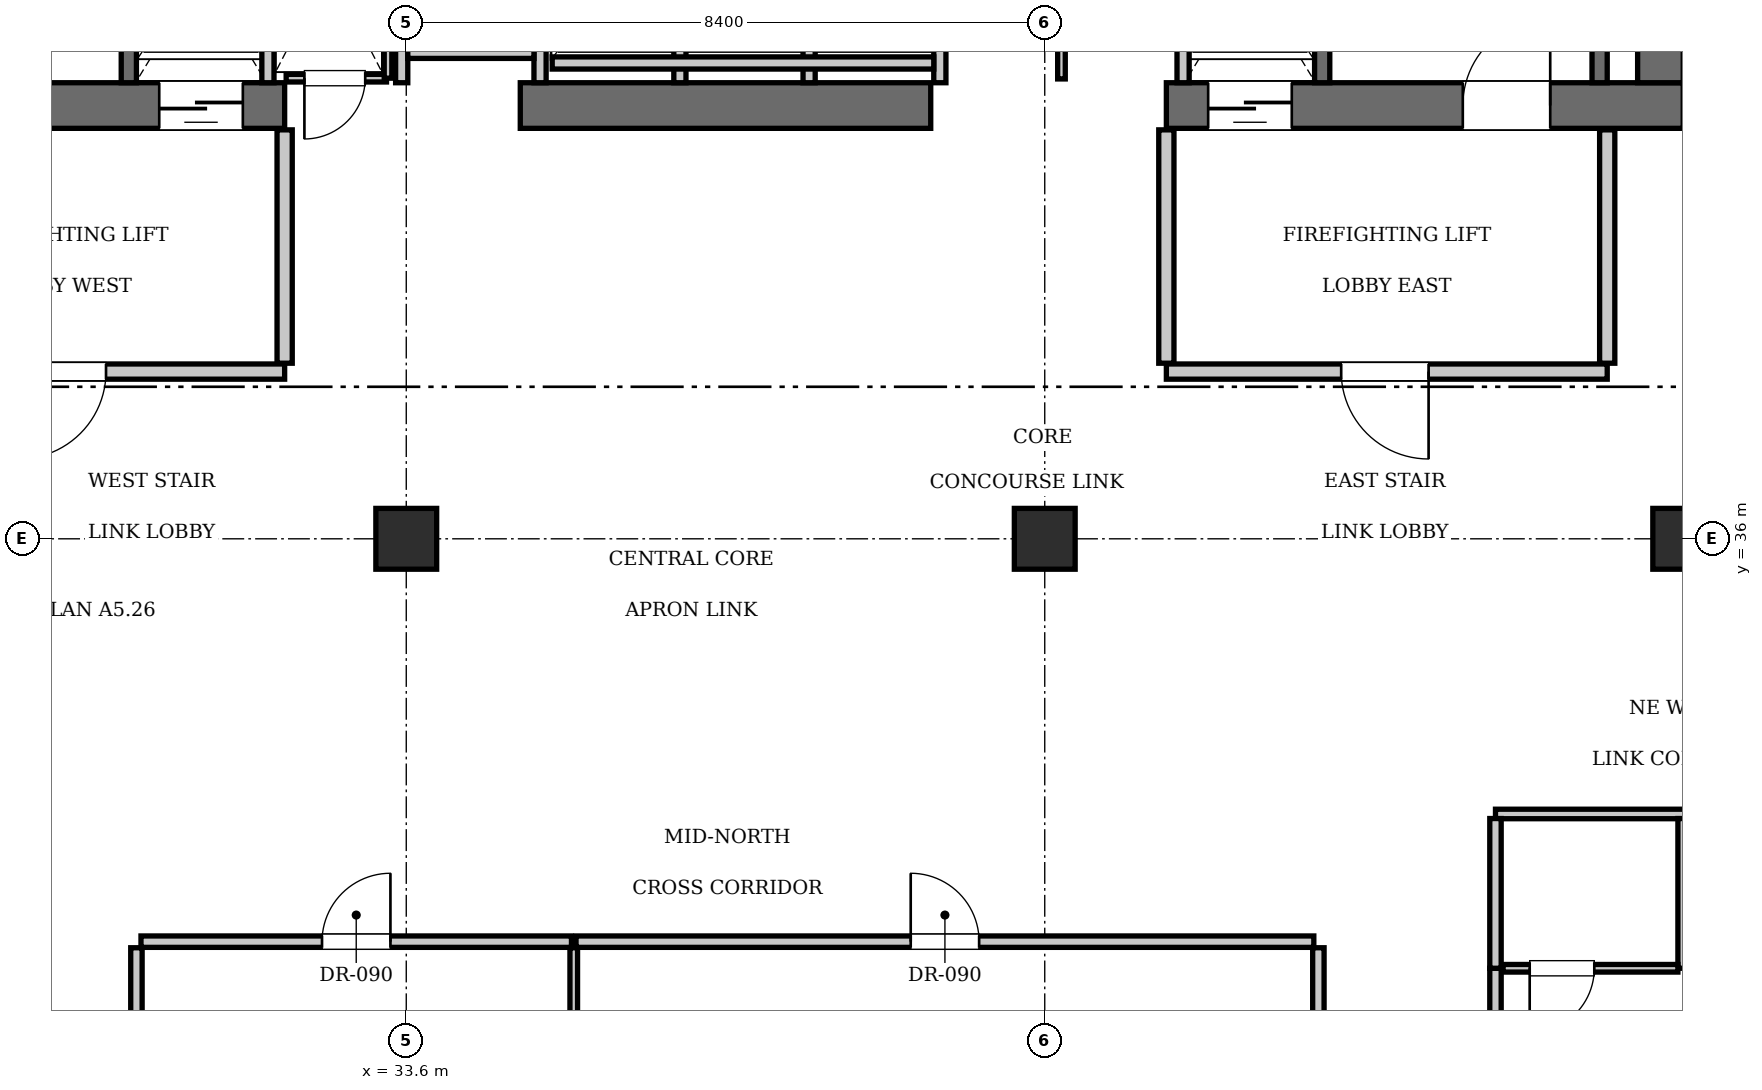
"""IFC4 building model, lengths in metres.
Left out: names, types, materials, properties, quantities, classifications, styles, units other than length and angle.
Written with IfcOpenShell. Run it as: python <this file> out.ifc"""

import sys

from ifc_helpers import new_model, si_unit, direction, frame, frame_2d, origin, origin_2d, place, context, subcontext, project, spatial, rectangle, extrude, element, fill, save


model = new_model("IFC4")
c1 = context("Model", 3, precision=1e-05, world=origin(), true_north=direction((0.0, 1.0)))
c2 = subcontext(c1, "Body", "Model", "MODEL_VIEW")
j1 = project(units=[si_unit("LENGTHUNIT", "METRE"), si_unit("PLANEANGLEUNIT", "RADIAN")], contexts=[c1])
p1 = place(None, origin())
s1 = spatial("IfcSite", under=j1, at=p1, CompositionType="ELEMENT")
p2 = place(p1, origin())
s2 = spatial("IfcBuilding", under=s1, at=p2, CompositionType="ELEMENT")
p3 = place(p2, frame((0.0, 0.0, 239.4)))
s3 = spatial("IfcBuildingStorey", under=s2, at=p3, CompositionType="ELEMENT", Elevation=239.4)
p4 = place(p3, frame((25.2, 41.7, 0.0), z_axis=(0.0, 0.0, 1.0), x_axis=(1.0, 0.0, 0.0)))
e1 = element("IfcWall", 1, at=p4, inside=s3, PredefinedType="SHEAR", context=c2, shape_type="SweptSolid", body=[
    extrude(rectangle(XDim=6.8, YDim=0.6, at=frame_2d((3.4, 0.0))), origin(), (0.0, 0.0, 1.0), 3.85),
])
p5 = place(p4, frame((1.65, 0.0, 0.0)))
e2 = element("IfcOpeningElement", 2, at=p5, cuts=e1, PredefinedType="OPENING", context=c2, shape_type="SweptSolid", body=[
    extrude(rectangle(XDim=1.15, YDim=2.15, at=frame_2d((0.575, 1.075))), frame((0.0, 0.31, 0.0), z_axis=(0.0, -1.0, 0.0), x_axis=(1.0, 0.0, 0.0)), (0.0, 0.0, 1.0), 0.62),
])
p6 = place(p4, frame((5.15, 0.0, 0.0)))
e3 = element("IfcOpeningElement", 3, at=p6, cuts=e1, PredefinedType="OPENING", context=c2, shape_type="SweptSolid", body=[
    extrude(rectangle(XDim=1.1, YDim=2.2, at=frame_2d((0.55, 1.1))), frame((0.0, 0.31, 0.0), z_axis=(0.0, -1.0, 0.0), x_axis=(1.0, 0.0, 0.0)), (0.0, 0.0, 1.0), 0.62),
])
p7 = place(p3, frame((35.1, 41.7, 0.0), z_axis=(0.0, 0.0, 1.0), x_axis=(1.0, 0.0, 0.0)))
e4 = element("IfcWall", 4, at=p7, inside=s3, PredefinedType="SHEAR", context=c2, shape_type="SweptSolid", body=[
    extrude(rectangle(XDim=5.4, YDim=0.6, at=frame_2d((2.7, 0.0))), origin(), (0.0, 0.0, 1.0), 3.85),
])
p8 = place(p3, frame((43.6, 41.7, 0.0), z_axis=(0.0, 0.0, 1.0), x_axis=(1.0, 0.0, 0.0)))
e5 = element("IfcWall", 5, at=p8, inside=s3, PredefinedType="SHEAR", context=c2, shape_type="SweptSolid", body=[
    extrude(rectangle(XDim=6.8, YDim=0.6, at=frame_2d((3.4, 0.0))), origin(), (0.0, 0.0, 1.0), 3.85),
])
p9 = place(p8, frame((3.9, 0.0, 0.0)))
e6 = element("IfcOpeningElement", 6, at=p9, cuts=e5, PredefinedType="OPENING", context=c2, shape_type="SweptSolid", body=[
    extrude(rectangle(XDim=1.15, YDim=2.15, at=frame_2d((0.575, 1.075))), frame((0.0, 0.31, 0.0), z_axis=(0.0, -1.0, 0.0), x_axis=(1.0, 0.0, 0.0)), (0.0, 0.0, 1.0), 0.62),
])
p10 = place(p8, frame((0.55, 0.0, 0.0)))
e7 = element("IfcOpeningElement", 7, at=p10, cuts=e5, PredefinedType="OPENING", context=c2, shape_type="SweptSolid", body=[
    extrude(rectangle(XDim=1.1, YDim=2.2, at=frame_2d((0.55, 1.1))), frame((0.0, 0.31, 0.0), z_axis=(0.0, -1.0, 0.0), x_axis=(1.0, 0.0, 0.0)), (0.0, 0.0, 1.0), 0.62),
])
p11 = place(p3, frame((50.1, 42.0, 0.0), z_axis=(0.0, 0.0, 1.0), x_axis=(0.0, 1.0, 0.0)))
e8 = element("IfcWall", 8, at=p11, inside=s3, PredefinedType="SHEAR", context=c2, shape_type="SweptSolid", body=[
    extrude(rectangle(XDim=2.2, YDim=0.6, at=frame_2d((1.1, 0.0))), origin(), (0.0, 0.0, 1.0), 3.85),
])
for number, where, z_axis, x_axis in (
    (9, (33.6, 36.0, 0.0), (0.0, 0.0, 1.0), (1.0, 0.0, 0.0)),
    (10, (42.0, 36.0, 0.0), (0.0, 0.0, 1.0), (1.0, 0.0, 0.0)),
    (11, (50.4, 36.0, 0.0), (0.0, 0.0, 1.0), (1.0, 0.0, 0.0)),
):
    element("IfcColumn", number, at=place(p3, frame(where, z_axis=z_axis, x_axis=x_axis)), inside=s3, PredefinedType="COLUMN", context=c2, shape_type="SweptSolid", body=[
        extrude(rectangle(XDim=0.8, YDim=0.8, at=origin_2d()), origin(), (0.0, 0.0, 1.0), 3.85),
    ])
for number, where, z_axis, x_axis in (
    (12, (29.95, 42.0, 0.0), (0.0, 0.0, 1.0), (0.0, 1.0, 0.0)),
    (13, (45.65, 42.0, 0.0), (0.0, 0.0, 1.0), (0.0, 1.0, 0.0)),
):
    element("IfcWall", number, at=place(p3, frame(where, z_axis=z_axis, x_axis=x_axis)), inside=s3, PredefinedType="SOLIDWALL", context=c2, shape_type="SweptSolid", body=[
        extrude(rectangle(XDim=9.15, YDim=0.2, at=frame_2d((4.575, 0.0))), origin(), (0.0, 0.0, 1.0), 3.61),
    ])
p12 = place(p3, frame((49.3, 42.0, 0.0), z_axis=(0.0, 0.0, 1.0), x_axis=(0.0, 1.0, 0.0)))
e14 = element("IfcWall", 14, at=p12, inside=s3, PredefinedType="SOLIDWALL", context=c2, shape_type="SweptSolid", body=[
    extrude(rectangle(XDim=9.12, YDim=0.2, at=frame_2d((4.56, 0.0))), origin(), (0.0, 0.0, 1.0), 3.61),
])
for number, where, z_axis, x_axis in (
    (15, (31.78, 42.0, 0.0), (0.0, 0.0, 1.0), (0.0, 1.0, 0.0)),
    (16, (43.82, 42.0, 0.0), (0.0, 0.0, 1.0), (0.0, 1.0, 0.0)),
):
    element("IfcWall", number, at=place(p3, frame(where, z_axis=z_axis, x_axis=x_axis)), inside=s3, PredefinedType="SOLIDWALL", context=c2, shape_type="SweptSolid", body=[
        extrude(rectangle(XDim=2.74, YDim=0.16, at=frame_2d((1.37, 0.0))), origin(), (0.0, 0.0, 1.0), 3.61),
    ])
for number, where, z_axis, x_axis in (
    (17, (37.2, 42.0, 0.0), (0.0, 0.0, 1.0), (0.0, 1.0, 0.0)),
    (18, (38.9, 42.0, 0.0), (0.0, 0.0, 1.0), (0.0, 1.0, 0.0)),
    (19, (40.62, 42.0, 0.0), (0.0, 0.0, 1.0), (0.0, 1.0, 0.0)),
):
    element("IfcWall", number, at=place(p3, frame(where, z_axis=z_axis, x_axis=x_axis)), inside=s3, PredefinedType="SOLIDWALL", context=c2, shape_type="SweptSolid", body=[
        extrude(rectangle(XDim=2.35, YDim=0.16, at=frame_2d((1.175, 0.0))), origin(), (0.0, 0.0, 1.0), 3.61),
    ])
p13 = place(p3, frame((35.52, 42.26, 0.0), z_axis=(0.0, 0.0, 1.0), x_axis=(1.0, 0.0, 0.0)))
e20 = element("IfcWall", 20, at=p13, inside=s3, PredefinedType="SOLIDWALL", context=c2, shape_type="SweptSolid", body=[
    extrude(rectangle(XDim=5.02, YDim=0.16, at=frame_2d((2.51, 0.0))), origin(), (0.0, 0.0, 1.0), 3.61),
])
for number, where, z_axis, x_axis in (
    (21, (33.54, 42.0, 0.0), (0.0, 0.0, 1.0), (0.0, 1.0, 0.0)),
    (22, (35.36, 42.0, 0.0), (0.0, 0.0, 1.0), (0.0, 1.0, 0.0)),
):
    element("IfcWall", number, at=place(p3, frame(where, z_axis=z_axis, x_axis=x_axis)), inside=s3, PredefinedType="SOLIDWALL", context=c2, shape_type="SweptSolid", body=[
        extrude(rectangle(XDim=2.4, YDim=0.16, at=frame_2d((1.2, 0.0))), origin(), (0.0, 0.0, 1.0), 3.61),
    ])
p14 = place(p3, frame((33.62, 42.4, 0.0), z_axis=(0.0, 0.0, 1.0), x_axis=(1.0, 0.0, 0.0)))
e23 = element("IfcWall", 23, at=p14, inside=s3, PredefinedType="SOLIDWALL", context=c2, shape_type="SweptSolid", body=[
    extrude(rectangle(XDim=1.66, YDim=0.16, at=frame_2d((0.83, 0.0))), origin(), (0.0, 0.0, 1.0), 3.61),
])
p15 = place(p3, frame((26.2, 38.2, 0.0), z_axis=(0.0, 0.0, 1.0), x_axis=(1.0, 0.0, 0.0)))
e24 = element("IfcWall", 24, at=p15, inside=s3, PredefinedType="PARTITIONING", context=c2, shape_type="SweptSolid", body=[
    extrude(rectangle(XDim=5.8, YDim=0.2, at=frame_2d((2.9, 0.0))), origin(), (0.0, 0.0, 1.0), 3.61),
])
p16 = place(p15, frame((2.3, 0.0, 0.0)))
e25 = element("IfcOpeningElement", 25, at=p16, cuts=e24, PredefinedType="OPENING", context=c2, shape_type="SweptSolid", body=[
    extrude(rectangle(XDim=1.15, YDim=2.15, at=frame_2d((0.575, 1.075))), frame((0.0, 0.11, 0.0), z_axis=(0.0, -1.0, 0.0), x_axis=(1.0, 0.0, 0.0)), (0.0, 0.0, 1.0), 0.22),
])
p17 = place(p3, frame((32.0, 38.31, 0.0), z_axis=(0.0, 0.0, 1.0), x_axis=(0.0, 1.0, 0.0)))
e26 = element("IfcWall", 26, at=p17, inside=s3, PredefinedType="PARTITIONING", context=c2, shape_type="SweptSolid", body=[
    extrude(rectangle(XDim=3.07, YDim=0.2, at=frame_2d((1.535, 0.0))), origin(), (0.0, 0.0, 1.0), 3.61),
])
p18 = place(p3, frame((43.6, 38.2, 0.0), z_axis=(0.0, 0.0, 1.0), x_axis=(1.0, 0.0, 0.0)))
e27 = element("IfcWall", 27, at=p18, inside=s3, PredefinedType="PARTITIONING", context=c2, shape_type="SweptSolid", body=[
    extrude(rectangle(XDim=5.8, YDim=0.2, at=frame_2d((2.9, 0.0))), origin(), (0.0, 0.0, 1.0), 3.61),
])
p19 = place(p18, frame((2.3, 0.0, 0.0)))
e28 = element("IfcOpeningElement", 28, at=p19, cuts=e27, PredefinedType="OPENING", context=c2, shape_type="SweptSolid", body=[
    extrude(rectangle(XDim=1.15, YDim=2.15, at=frame_2d((0.575, 1.075))), frame((0.0, 0.11, 0.0), z_axis=(0.0, -1.0, 0.0), x_axis=(1.0, 0.0, 0.0)), (0.0, 0.0, 1.0), 0.22),
])
for number, where, z_axis, x_axis in (
    (29, (43.6, 38.31, 0.0), (0.0, 0.0, 1.0), (0.0, 1.0, 0.0)),
    (30, (49.4, 38.31, 0.0), (0.0, 0.0, 1.0), (0.0, 1.0, 0.0)),
):
    element("IfcWall", number, at=place(p3, frame(where, z_axis=z_axis, x_axis=x_axis)), inside=s3, PredefinedType="PARTITIONING", context=c2, shape_type="SweptSolid", body=[
        extrude(rectangle(XDim=3.07, YDim=0.2, at=frame_2d((1.535, 0.0))), origin(), (0.0, 0.0, 1.0), 3.61),
    ])
p20 = place(p3, frame((32.02, 42.06, 0.0), z_axis=(0.0, 0.0, 1.0), x_axis=(1.0, 0.0, 0.0)))
e31 = element("IfcWall", 31, at=p20, inside=s3, PredefinedType="PARTITIONING", context=c2, shape_type="SweptSolid", body=[
    extrude(rectangle(XDim=1.32, YDim=0.1, at=frame_2d((0.66, 0.0))), origin(), (0.0, 0.0, 1.0), 3.61),
])
p21 = place(p20, frame((0.24, 0.0, 0.0)))
e32 = element("IfcOpeningElement", 32, at=p21, cuts=e31, PredefinedType="OPENING", context=c2, shape_type="SweptSolid", body=[
    extrude(rectangle(XDim=0.8, YDim=2.05, at=frame_2d((0.4, 1.025))), frame((0.0, 0.06, 0.0), z_axis=(0.0, -1.0, 0.0), x_axis=(1.0, 0.0, 0.0)), (0.0, 0.0, 1.0), 0.12),
])
p22 = place(p3, frame((33.36, 42.06, 0.0), z_axis=(0.0, 0.0, 1.0), x_axis=(0.0, 1.0, 0.0)))
e33 = element("IfcWall", 33, at=p22, inside=s3, PredefinedType="PARTITIONING", context=c2, shape_type="SweptSolid", body=[
    extrude(rectangle(XDim=2.88, YDim=0.1, at=frame_2d((1.44, 0.0))), origin(), (0.0, 0.0, 1.0), 3.61),
])
p23 = place(p3, frame((42.22, 42.05, 0.0), z_axis=(0.0, 0.0, 1.0), x_axis=(0.0, 1.0, 0.0)))
e34 = element("IfcWall", 34, at=p23, inside=s3, PredefinedType="PARTITIONING", context=c2, shape_type="SweptSolid", body=[
    extrude(rectangle(XDim=2.91, YDim=0.1, at=frame_2d((1.455, 0.0))), origin(), (0.0, 0.0, 1.0), 3.61),
])
p24 = place(p23, frame((0.65, 0.0, 0.0)))
e35 = element("IfcOpeningElement", 35, at=p24, cuts=e34, PredefinedType="OPENING", context=c2, shape_type="SweptSolid", body=[
    extrude(rectangle(XDim=0.8, YDim=2.05, at=frame_2d((0.4, 1.025))), frame((0.0, 0.06, 0.0), z_axis=(0.0, -1.0, 0.0), x_axis=(1.0, 0.0, 0.0)), (0.0, 0.0, 1.0), 0.12),
])
for number, where, z_axis, x_axis in (
    (36, (30.05, 21.13, 0.0), (0.0, 0.0, 1.0), (0.0, 1.0, 0.0)),
    (37, (45.6, 21.13, 0.0), (0.0, 0.0, 1.0), (0.0, 1.0, 0.0)),
):
    element("IfcWall", number, at=place(p3, frame(where, z_axis=z_axis, x_axis=x_axis)), inside=s3, PredefinedType="PARTITIONING", context=c2, shape_type="SweptSolid", body=[
        extrude(rectangle(XDim=9.49, YDim=0.15, at=frame_2d((4.745, 0.0))), origin(), (0.0, 0.0, 1.0), 3.61),
    ])
p25 = place(p3, frame((30.11, 30.7, 0.0), z_axis=(0.0, 0.0, 1.0), x_axis=(1.0, 0.0, 0.0)))
e38 = element("IfcWall", 38, at=p25, inside=s3, PredefinedType="PARTITIONING", context=c2, shape_type="SweptSolid", body=[
    extrude(rectangle(XDim=5.663, YDim=0.15, at=frame_2d((2.832, 0.0))), origin(), (0.0, 0.0, 1.0), 3.61),
])
p26 = place(p25, frame((2.382, 0.0, 0.0)))
e39 = element("IfcOpeningElement", 39, at=p26, cuts=e38, PredefinedType="OPENING", context=c2, shape_type="SweptSolid", body=[
    extrude(rectangle(XDim=0.9, YDim=2.1, at=frame_2d((0.45, 1.05))), frame((0.0, 0.085, 0.0), z_axis=(0.0, -1.0, 0.0), x_axis=(1.0, 0.0, 0.0)), (0.0, 0.0, 1.0), 0.17),
])
p27 = place(p3, frame((35.803, 21.13, 0.0), z_axis=(0.0, 0.0, 1.0), x_axis=(0.0, 1.0, 0.0)))
e40 = element("IfcWall", 40, at=p27, inside=s3, PredefinedType="PARTITIONING", context=c2, shape_type="SweptSolid", body=[
    extrude(rectangle(XDim=9.49, YDim=0.1, at=frame_2d((4.745, 0.0))), origin(), (0.0, 0.0, 1.0), 3.61),
])
p28 = place(p3, frame((35.833, 30.7, 0.0), z_axis=(0.0, 0.0, 1.0), x_axis=(1.0, 0.0, 0.0)))
e41 = element("IfcWall", 41, at=p28, inside=s3, PredefinedType="PARTITIONING", context=c2, shape_type="SweptSolid", body=[
    extrude(rectangle(XDim=9.707, YDim=0.15, at=frame_2d((4.853, 0.0))), origin(), (0.0, 0.0, 1.0), 3.61),
])
p29 = place(p28, frame((4.403, 0.0, 0.0)))
e42 = element("IfcOpeningElement", 42, at=p29, cuts=e41, PredefinedType="OPENING", context=c2, shape_type="SweptSolid", body=[
    extrude(rectangle(XDim=0.9, YDim=2.1, at=frame_2d((0.45, 1.05))), frame((0.0, 0.085, 0.0), z_axis=(0.0, -1.0, 0.0), x_axis=(1.0, 0.0, 0.0)), (0.0, 0.0, 1.0), 0.17),
])
p30 = place(p3, frame((47.93, 32.38, 0.0), z_axis=(0.0, 0.0, 1.0), x_axis=(1.0, 0.0, 0.0)))
e43 = element("IfcWall", 43, at=p30, inside=s3, PredefinedType="PARTITIONING", context=c2, shape_type="SweptSolid", body=[
    extrude(rectangle(XDim=12.17, YDim=0.125, at=frame_2d((6.085, 0.0))), origin(), (0.0, 0.0, 1.0), 3.61),
])
p31 = place(p3, frame((47.93, 26.8, 0.0), z_axis=(0.0, 0.0, 1.0), x_axis=(0.0, 1.0, 0.0)))
e44 = element("IfcWall", 44, at=p31, inside=s3, PredefinedType="PARTITIONING", context=c2, shape_type="SweptSolid", body=[
    extrude(rectangle(XDim=3.55, YDim=0.15, at=frame_2d((1.775, 0.0))), origin(), (0.0, 0.0, 1.0), 3.61),
])
p32 = place(p31, frame((1.3, 0.0, 0.0)))
e45 = element("IfcOpeningElement", 45, at=p32, cuts=e44, PredefinedType="OPENING", context=c2, shape_type="SweptSolid", body=[
    extrude(rectangle(XDim=0.95, YDim=2.15, at=frame_2d((0.475, 1.075))), frame((0.0, 0.085, 0.0), z_axis=(0.0, -1.0, 0.0), x_axis=(1.0, 0.0, 0.0)), (0.0, 0.0, 1.0), 0.17),
])
p33 = place(p3, frame((47.93, 30.35, 0.0), z_axis=(0.0, 0.0, 1.0), x_axis=(0.0, 1.0, 0.0)))
e46 = element("IfcWall", 46, at=p33, inside=s3, PredefinedType="PARTITIONING", context=c2, shape_type="SweptSolid", body=[
    extrude(rectangle(XDim=1.97, YDim=0.15, at=frame_2d((0.985, 0.0))), origin(), (0.0, 0.0, 1.0), 3.61),
])
p34 = place(p3, frame((50.38, 30.35, 0.0), z_axis=(0.0, 0.0, 1.0), x_axis=(0.0, 1.0, 0.0)))
e47 = element("IfcWall", 47, at=p34, inside=s3, PredefinedType="PARTITIONING", context=c2, shape_type="SweptSolid", body=[
    extrude(rectangle(XDim=1.97, YDim=0.1, at=frame_2d((0.985, 0.0))), origin(), (0.0, 0.0, 1.0), 3.077),
])
p35 = place(p3, frame((48.03, 30.35, 0.0), z_axis=(0.0, 0.0, 1.0), x_axis=(1.0, 0.0, 0.0)))
e48 = element("IfcWall", 48, at=p35, inside=s3, PredefinedType="PARTITIONING", context=c2, shape_type="SweptSolid", body=[
    extrude(rectangle(XDim=2.3, YDim=0.1, at=frame_2d((1.15, 0.0))), origin(), (0.0, 0.0, 1.0), 3.61),
])
p36 = place(p35, frame((0.35, 0.0, 0.0)))
e49 = element("IfcOpeningElement", 49, at=p36, cuts=e48, PredefinedType="OPENING", context=c2, shape_type="SweptSolid", body=[
    extrude(rectangle(XDim=0.85, YDim=2.1, at=frame_2d((0.425, 1.05))), frame((0.0, 0.06, 0.0), z_axis=(0.0, -1.0, 0.0), x_axis=(1.0, 0.0, 0.0)), (0.0, 0.0, 1.0), 0.12),
])
p37 = place(p9, origin())
e50 = element("IfcDoor", 50, at=p37, inside=s3, OperationType="SINGLE_SWING_RIGHT", PredefinedType="DOOR", context=c2, shape_type="SweptSolid", body=[
    extrude(rectangle(XDim=1.15, YDim=2.15, at=frame_2d((0.575, 1.075))), frame((0.0, 0.025, 0.0), z_axis=(0.0, -1.0, 0.0), x_axis=(1.0, 0.0, 0.0)), (0.0, 0.0, 1.0), 0.05),
])
fill(e6, e50)
p38 = place(p6, frame((1.1, 0.0, 0.0), z_axis=(0.0, 0.0, 1.0), x_axis=(-1.0, 0.0, 0.0)))
e51 = element("IfcDoor", 51, at=p38, inside=s3, OperationType="SLIDING_TO_LEFT", PredefinedType="DOOR", context=c2, shape_type="SweptSolid", body=[
    extrude(rectangle(XDim=1.1, YDim=2.2, at=frame_2d((0.55, 1.1))), frame((0.0, 0.025, 0.0), z_axis=(0.0, -1.0, 0.0), x_axis=(1.0, 0.0, 0.0)), (0.0, 0.0, 1.0), 0.05),
])
fill(e3, e51)
p39 = place(p10, frame((1.1, 0.0, 0.0), z_axis=(0.0, 0.0, 1.0), x_axis=(-1.0, 0.0, 0.0)))
e52 = element("IfcDoor", 52, at=p39, inside=s3, OperationType="SLIDING_TO_LEFT", PredefinedType="DOOR", context=c2, shape_type="SweptSolid", body=[
    extrude(rectangle(XDim=1.1, YDim=2.2, at=frame_2d((0.55, 1.1))), frame((0.0, 0.025, 0.0), z_axis=(0.0, -1.0, 0.0), x_axis=(1.0, 0.0, 0.0)), (0.0, 0.0, 1.0), 0.05),
])
fill(e7, e52)
p40 = place(p16, frame((1.15, 0.0, 0.0), z_axis=(0.0, 0.0, 1.0), x_axis=(-1.0, 0.0, 0.0)))
e53 = element("IfcDoor", 53, at=p40, inside=s3, OperationType="SINGLE_SWING_RIGHT", PredefinedType="DOOR", context=c2, shape_type="SweptSolid", body=[
    extrude(rectangle(XDim=1.15, YDim=2.15, at=frame_2d((0.575, 1.075))), frame((0.0, 0.025, 0.0), z_axis=(0.0, -1.0, 0.0), x_axis=(1.0, 0.0, 0.0)), (0.0, 0.0, 1.0), 0.05),
])
fill(e25, e53)
p41 = place(p19, frame((1.15, 0.0, 0.0), z_axis=(0.0, 0.0, 1.0), x_axis=(-1.0, 0.0, 0.0)))
e54 = element("IfcDoor", 54, at=p41, inside=s3, OperationType="SINGLE_SWING_LEFT", PredefinedType="DOOR", context=c2, shape_type="SweptSolid", body=[
    extrude(rectangle(XDim=1.15, YDim=2.15, at=frame_2d((0.575, 1.075))), frame((0.0, 0.025, 0.0), z_axis=(0.0, -1.0, 0.0), x_axis=(1.0, 0.0, 0.0)), (0.0, 0.0, 1.0), 0.05),
])
fill(e28, e54)
p42 = place(p21, frame((0.8, 0.0, 0.0), z_axis=(0.0, 0.0, 1.0), x_axis=(-1.0, 0.0, 0.0)))
e55 = element("IfcDoor", 55, at=p42, inside=s3, OperationType="SINGLE_SWING_RIGHT", PredefinedType="DOOR", context=c2, shape_type="SweptSolid", body=[
    extrude(rectangle(XDim=0.8, YDim=2.05, at=frame_2d((0.4, 1.025))), frame((0.0, 0.025, 0.0), z_axis=(0.0, -1.0, 0.0), x_axis=(1.0, 0.0, 0.0)), (0.0, 0.0, 1.0), 0.05),
])
fill(e32, e55)
p43 = place(p26, origin())
e56 = element("IfcDoor", 56, at=p43, inside=s3, OperationType="SINGLE_SWING_RIGHT", PredefinedType="DOOR", context=c2, shape_type="SweptSolid", body=[
    extrude(rectangle(XDim=0.9, YDim=2.1, at=frame_2d((0.45, 1.05))), frame((0.0, 0.025, 0.0), z_axis=(0.0, -1.0, 0.0), x_axis=(1.0, 0.0, 0.0)), (0.0, 0.0, 1.0), 0.05),
])
fill(e39, e56)
p44 = place(p29, origin())
e57 = element("IfcDoor", 57, at=p44, inside=s3, OperationType="SINGLE_SWING_LEFT", PredefinedType="DOOR", context=c2, shape_type="SweptSolid", body=[
    extrude(rectangle(XDim=0.9, YDim=2.1, at=frame_2d((0.45, 1.05))), frame((0.0, 0.025, 0.0), z_axis=(0.0, -1.0, 0.0), x_axis=(1.0, 0.0, 0.0)), (0.0, 0.0, 1.0), 0.05),
])
fill(e42, e57)
p45 = place(p36, frame((0.85, 0.0, 0.0), z_axis=(0.0, 0.0, 1.0), x_axis=(-1.0, 0.0, 0.0)))
e58 = element("IfcDoor", 58, at=p45, inside=s3, OperationType="SINGLE_SWING_RIGHT", PredefinedType="DOOR", context=c2, shape_type="SweptSolid", body=[
    extrude(rectangle(XDim=0.85, YDim=2.1, at=frame_2d((0.425, 1.05))), frame((0.0, 0.025, 0.0), z_axis=(0.0, -1.0, 0.0), x_axis=(1.0, 0.0, 0.0)), (0.0, 0.0, 1.0), 0.05),
])
fill(e49, e58)
save(model, sys.argv[1])
